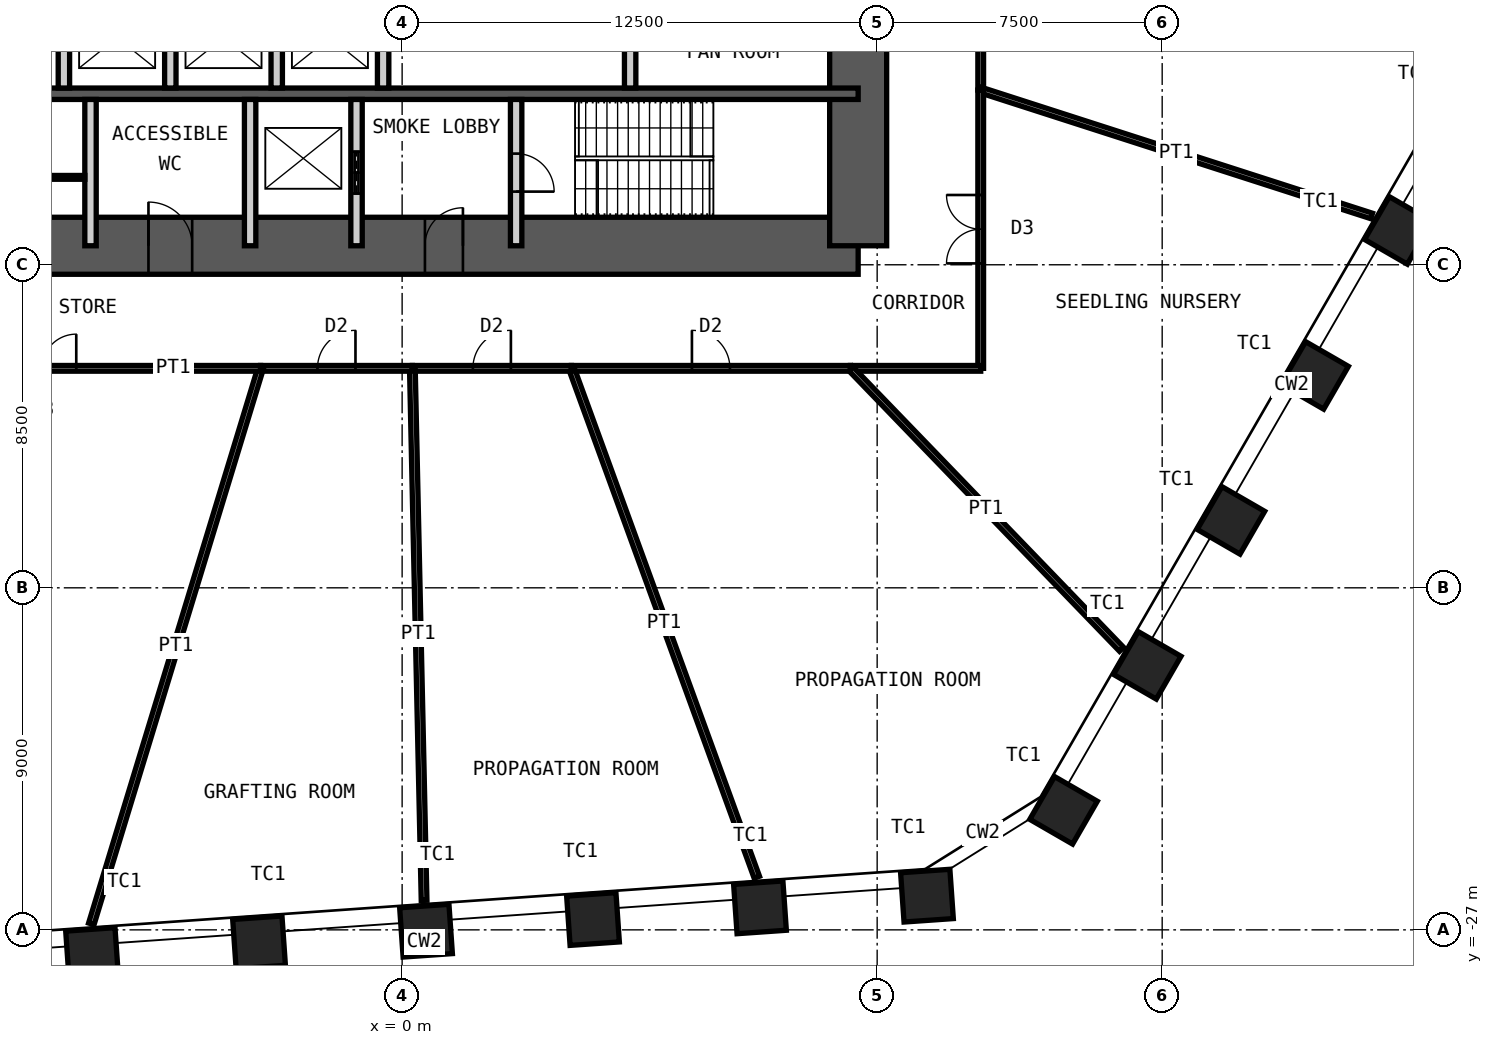
"""IFC4 building model, lengths in metres.
Left out: names, types, materials, properties, quantities, classifications, styles, units other than length and angle.
Written with IfcOpenShell. Run it as: python <this file> out.ifc"""

import sys

from ifc_helpers import new_model, si_unit, direction, frame, frame_2d, origin, origin_2d, place, context, subcontext, project, spatial, rectangle, hollow_rectangle, extrude, element, fill, save


model = new_model("IFC4")
c1 = context("Model", 3, precision=1e-05, world=origin(), true_north=direction((0.0, 1.0)))
c2 = subcontext(c1, "Body", "Model", "MODEL_VIEW")
j1 = project(units=[si_unit("LENGTHUNIT", "METRE"), si_unit("PLANEANGLEUNIT", "RADIAN")], contexts=[c1])
p1 = place(None, origin())
s1 = spatial("IfcSite", under=j1, at=p1, CompositionType="ELEMENT")
p2 = place(p1, origin())
s2 = spatial("IfcBuilding", under=s1, at=p2, CompositionType="ELEMENT")
p3 = place(p2, frame((0.0, 0.0, 32.0)))
s3 = spatial("IfcBuildingStorey", under=s2, at=p3, CompositionType="ELEMENT", Elevation=32.0)
for number, where, z_axis, x_axis in (
    (1, (26.214, -8.596, 0.0), (0.0, 0.0, 1.0), (0.5, 0.866, 0.0)),
    (2, (24.011, -12.411, 0.0), (0.0, 0.0, 1.0), (0.5, 0.866, 0.0)),
    (3, (21.809, -16.225, 0.0), (0.0, 0.0, 1.0), (0.5, 0.866, 0.0)),
    (4, (19.607, -20.04, 0.0), (0.0, 0.0, 1.0), (0.5, 0.866, 0.0)),
    (5, (17.405, -23.854, 0.0), (0.0, 0.0, 1.0), (0.5, 0.866, 0.0)),
    (6, (13.811, -26.1, 0.0), (0.0, 0.0, 1.0), (0.998, 0.07, 0.0)),
    (7, (9.417, -26.407, 0.0), (0.0, 0.0, 1.0), (0.998, 0.07, 0.0)),
    (8, (5.023, -26.715, 0.0), (0.0, 0.0, 1.0), (0.998, 0.07, 0.0)),
    (9, (0.629, -27.022, 0.0), (0.0, 0.0, 1.0), (0.998, 0.07, 0.0)),
    (10, (-3.765, -27.329, 0.0), (0.0, 0.0, 1.0), (0.998, 0.07, 0.0)),
    (11, (-8.159, -27.636, 0.0), (0.0, 0.0, 1.0), (0.998, 0.07, 0.0)),
):
    element("IfcColumn", number, at=place(p3, frame(where, z_axis=z_axis, x_axis=x_axis)), inside=s3, PredefinedType="COLUMN", context=c2, shape_type="SweptSolid", body=[
        extrude(hollow_rectangle(XDim=1.3, YDim=1.3, WallThickness=0.1, at=origin_2d()), origin(), (0.0, 0.0, 1.0), 5.0),
    ])
p4 = place(p3, frame((-12.0, -9.0, 0.0), z_axis=(0.0, 0.0, 1.0), x_axis=(1.0, 0.0, 0.0)))
e12 = element("IfcWall", 12, at=p4, inside=s3, PredefinedType="SHEAR", context=c2, shape_type="SweptSolid", body=[
    extrude(rectangle(XDim=24.0, YDim=1.5, at=frame_2d((12.0, 0.0))), origin(), (0.0, 0.0, 1.0), 5.0),
])
p5 = place(p4, frame((1.35, 0.0, 0.0)))
e13 = element("IfcOpeningElement", 13, at=p5, cuts=e12, PredefinedType="OPENING", context=c2, shape_type="SweptSolid", body=[
    extrude(rectangle(XDim=1.0, YDim=2.1, at=frame_2d((0.5, 1.05))), frame((0.0, 0.76, 0.0), z_axis=(0.0, -1.0, 0.0), x_axis=(1.0, 0.0, 0.0)), (0.0, 0.0, 1.0), 1.52),
])
p6 = place(p4, frame((5.325, 0.0, 0.0)))
e14 = element("IfcOpeningElement", 14, at=p6, cuts=e12, PredefinedType="OPENING", context=c2, shape_type="SweptSolid", body=[
    extrude(rectangle(XDim=1.15, YDim=2.1, at=frame_2d((0.575, 1.05))), frame((0.0, 0.76, 0.0), z_axis=(0.0, -1.0, 0.0), x_axis=(1.0, 0.0, 0.0)), (0.0, 0.0, 1.0), 1.52),
])
p7 = place(p4, frame((12.6, 0.0, 0.0)))
e15 = element("IfcOpeningElement", 15, at=p7, cuts=e12, PredefinedType="OPENING", context=c2, shape_type="SweptSolid", body=[
    extrude(rectangle(XDim=1.0, YDim=2.1, at=frame_2d((0.5, 1.05))), frame((0.0, 0.76, 0.0), z_axis=(0.0, -1.0, 0.0), x_axis=(1.0, 0.0, 0.0)), (0.0, 0.0, 1.0), 1.52),
])
p8 = place(p3, frame((12.0, -9.0, 0.0), z_axis=(0.0, 0.0, 1.0), x_axis=(0.0, 1.0, 0.0)))
e16 = element("IfcWall", 16, at=p8, inside=s3, PredefinedType="SHEAR", context=c2, shape_type="SweptSolid", body=[
    extrude(rectangle(XDim=18.0, YDim=1.5, at=frame_2d((9.0, 0.0))), origin(), (0.0, 0.0, 1.0), 5.0),
])
p9 = place(p8, frame((8.1, 0.0, 0.0)))
e17 = element("IfcOpeningElement", 17, at=p9, cuts=e16, PredefinedType="OPENING", context=c2, shape_type="SweptSolid", body=[
    extrude(rectangle(XDim=1.8, YDim=2.1, at=frame_2d((0.9, 1.05))), frame((0.0, 0.76, 0.0), z_axis=(0.0, -1.0, 0.0), x_axis=(1.0, 0.0, 0.0)), (0.0, 0.0, 1.0), 1.52),
])
p10 = place(p3, frame((-12.0, -5.0, 0.0), z_axis=(0.0, 0.0, 1.0), x_axis=(1.0, 0.0, 0.0)))
e18 = element("IfcWall", 18, at=p10, inside=s3, PredefinedType="SHEAR", context=c2, shape_type="SweptSolid", body=[
    extrude(rectangle(XDim=24.0, YDim=0.3, at=frame_2d((12.0, 0.0))), origin(), (0.0, 0.0, 1.0), 5.0),
])
for number, where, z_axis, x_axis in (
    (19, (-8.9, -4.85, 0.0), (0.0, 0.0, 1.0), (0.0, 1.0, 0.0)),
    (20, (-6.1, -4.85, 0.0), (0.0, 0.0, 1.0), (0.0, 1.0, 0.0)),
    (21, (-3.3, -4.85, 0.0), (0.0, 0.0, 1.0), (0.0, 1.0, 0.0)),
    (22, (-0.5, -4.85, 0.0), (0.0, 0.0, 1.0), (0.0, 1.0, 0.0)),
    (23, (6.0, -4.85, 0.0), (0.0, 0.0, 1.0), (0.0, 1.0, 0.0)),
):
    element("IfcWall", number, at=place(p3, frame(where, z_axis=z_axis, x_axis=x_axis)), inside=s3, PredefinedType="PARTITIONING", context=c2, shape_type="SweptSolid", body=[
        extrude(rectangle(XDim=2.65, YDim=0.3, at=frame_2d((1.325, 0.0))), origin(), (0.0, 0.0, 1.0), 4.78),
    ])
for number, where, z_axis, x_axis in (
    (24, (-8.2, -9.0, 0.0), (0.0, 0.0, 1.0), (0.0, 1.0, 0.0)),
    (25, (-4.0, -9.0, 0.0), (0.0, 0.0, 1.0), (0.0, 1.0, 0.0)),
):
    element("IfcWall", number, at=place(p3, frame(where, z_axis=z_axis, x_axis=x_axis)), inside=s3, PredefinedType="PARTITIONING", context=c2, shape_type="SweptSolid", body=[
        extrude(rectangle(XDim=3.85, YDim=0.3, at=frame_2d((1.925, 0.0))), origin(), (0.0, 0.0, 1.0), 4.78),
    ])
p11 = place(p3, frame((-1.2, -9.0, 0.0), z_axis=(0.0, 0.0, 1.0), x_axis=(0.0, 1.0, 0.0)))
e26 = element("IfcWall", 26, at=p11, inside=s3, PredefinedType="PARTITIONING", context=c2, shape_type="SweptSolid", body=[
    extrude(rectangle(XDim=3.85, YDim=0.3, at=frame_2d((1.925, 0.0))), origin(), (0.0, 0.0, 1.0), 4.78),
])
p12 = place(p11, frame((1.375, 0.0, 0.0)))
e27 = element("IfcOpeningElement", 27, at=p12, cuts=e26, PredefinedType="OPENING", context=c2, shape_type="SweptSolid", body=[
    extrude(rectangle(XDim=1.1, YDim=2.4, at=frame_2d((0.55, 1.2))), frame((0.0, 0.16, 0.0), z_axis=(0.0, -1.0, 0.0), x_axis=(1.0, 0.0, 0.0)), (0.0, 0.0, 1.0), 0.32),
])
p13 = place(p3, frame((3.0, -9.0, 0.0), z_axis=(0.0, 0.0, 1.0), x_axis=(0.0, 1.0, 0.0)))
e28 = element("IfcWall", 28, at=p13, inside=s3, PredefinedType="PARTITIONING", context=c2, shape_type="SweptSolid", body=[
    extrude(rectangle(XDim=3.85, YDim=0.3, at=frame_2d((1.925, 0.0))), origin(), (0.0, 0.0, 1.0), 4.78),
])
p14 = place(p13, frame((1.425, 0.0, 0.0)))
e29 = element("IfcOpeningElement", 29, at=p14, cuts=e28, PredefinedType="OPENING", context=c2, shape_type="SweptSolid", body=[
    extrude(rectangle(XDim=1.0, YDim=2.1, at=frame_2d((0.5, 1.05))), frame((0.0, 0.16, 0.0), z_axis=(0.0, -1.0, 0.0), x_axis=(1.0, 0.0, 0.0)), (0.0, 0.0, 1.0), 0.32),
])
p15 = place(p3, frame((-11.25, -7.2, 0.0), z_axis=(0.0, 0.0, 1.0), x_axis=(1.0, 0.0, 0.0)))
e30 = element("IfcWall", 30, at=p15, inside=s3, PredefinedType="PARTITIONING", context=c2, shape_type="SweptSolid", body=[
    extrude(rectangle(XDim=2.9, YDim=0.1, at=frame_2d((1.45, 0.0))), origin(), (0.0, 0.0, 1.0), 4.78),
])
p16 = place(p15, frame((0.1, 0.0, 0.0)))
e31 = element("IfcOpeningElement", 31, at=p16, cuts=e30, PredefinedType="OPENING", context=c2, shape_type="SweptSolid", body=[
    extrude(rectangle(XDim=1.0, YDim=2.4, at=frame_2d((0.5, 1.2))), frame((0.0, 0.06, 0.0), z_axis=(0.0, -1.0, 0.0), x_axis=(1.0, 0.0, 0.0)), (0.0, 0.0, 1.0), 0.12),
])
p17 = place(p3, frame((15.225, 3.53, 0.0), z_axis=(0.0, 0.0, 1.0), x_axis=(0.0, -1.0, 0.0)))
e32 = element("IfcWall", 32, at=p17, inside=s3, PredefinedType="PARTITIONING", context=c2, shape_type="SweptSolid", body=[
    extrude(rectangle(XDim=8.433, YDim=0.15, at=frame_2d((4.217, 0.0))), origin(), (0.0, 0.0, 1.0), 4.8),
])
p18 = place(p17, frame((3.317, 0.0, 0.0)))
e33 = element("IfcOpeningElement", 33, at=p18, cuts=e32, PredefinedType="OPENING", context=c2, shape_type="SweptSolid", body=[
    extrude(rectangle(XDim=1.8, YDim=2.4, at=frame_2d((0.9, 1.2))), frame((0.0, 0.085, 0.0), z_axis=(0.0, -1.0, 0.0), x_axis=(1.0, 0.0, 0.0)), (0.0, 0.0, 1.0), 0.17),
])
p19 = place(p3, frame((25.512, -8.216, 0.0), z_axis=(0.0, 0.0, 1.0), x_axis=(-0.95186413264, 0.306520265225, 0.0)))
e34 = element("IfcWall", 34, at=p19, inside=s3, PredefinedType="PARTITIONING", context=c2, shape_type="SweptSolid", body=[
    extrude(rectangle(XDim=10.808, YDim=0.15, at=frame_2d((5.404, 0.0))), origin(), (0.0, 0.0, 1.0), 3.7),
])
p20 = place(p3, frame((15.225, -4.903, 0.0), z_axis=(0.0, 0.0, 1.0), x_axis=(0.0, -1.0, 0.0)))
e35 = element("IfcWall", 35, at=p20, inside=s3, PredefinedType="PARTITIONING", context=c2, shape_type="SweptSolid", body=[
    extrude(rectangle(XDim=7.322, YDim=0.15, at=frame_2d((3.661, 0.0))), origin(), (0.0, 0.0, 1.0), 4.8),
])
p21 = place(p20, frame((2.761, 0.0, 0.0)))
e36 = element("IfcOpeningElement", 36, at=p21, cuts=e35, PredefinedType="OPENING", context=c2, shape_type="SweptSolid", body=[
    extrude(rectangle(XDim=1.8, YDim=2.4, at=frame_2d((0.9, 1.2))), frame((0.0, 0.085, 0.0), z_axis=(0.0, -1.0, 0.0), x_axis=(1.0, 0.0, 0.0)), (0.0, 0.0, 1.0), 0.17),
])
p22 = place(p3, frame((15.225, -12.225, 0.0), z_axis=(0.0, 0.0, 1.0), x_axis=(-1.0, 0.0, 0.0)))
e37 = element("IfcWall", 37, at=p22, inside=s3, PredefinedType="PARTITIONING", context=c2, shape_type="SweptSolid", body=[
    extrude(rectangle(XDim=3.428, YDim=0.15, at=frame_2d((1.714, 0.0))), origin(), (0.0, 0.0, 1.0), 4.8),
])
p23 = place(p3, frame((18.931, -19.618, 0.0), z_axis=(0.0, 0.0, 1.0), x_axis=(-0.694399830455, 0.719589379761, 0.0)))
e38 = element("IfcWall", 38, at=p23, inside=s3, PredefinedType="PARTITIONING", context=c2, shape_type="SweptSolid", body=[
    extrude(rectangle(XDim=10.274, YDim=0.15, at=frame_2d((5.137, 0.0))), origin(), (0.0, 0.0, 1.0), 3.7),
])
p24 = place(p3, frame((11.797, -12.225, 0.0), z_axis=(0.0, 0.0, 1.0), x_axis=(-1.0, 0.0, 0.0)))
e39 = element("IfcWall", 39, at=p24, inside=s3, PredefinedType="PARTITIONING", context=c2, shape_type="SweptSolid", body=[
    extrude(rectangle(XDim=7.343, YDim=0.15, at=frame_2d((3.671, 0.0))), origin(), (0.0, 0.0, 1.0), 4.8),
])
p25 = place(p24, frame((3.171, 0.0, 0.0)))
e40 = element("IfcOpeningElement", 40, at=p25, cuts=e39, PredefinedType="OPENING", context=c2, shape_type="SweptSolid", body=[
    extrude(rectangle(XDim=1.0, YDim=2.4, at=frame_2d((0.5, 1.2))), frame((0.0, 0.085, 0.0), z_axis=(0.0, -1.0, 0.0), x_axis=(1.0, 0.0, 0.0)), (0.0, 0.0, 1.0), 0.17),
])
p26 = place(p3, frame((9.333, -25.615, 0.0), z_axis=(0.0, 0.0, 1.0), x_axis=(-0.342348208267, 0.939573150051, 0.0)))
e41 = element("IfcWall", 41, at=p26, inside=s3, PredefinedType="PARTITIONING", context=c2, shape_type="SweptSolid", body=[
    extrude(rectangle(XDim=14.251, YDim=0.15, at=frame_2d((7.125, 0.0))), origin(), (0.0, 0.0, 1.0), 3.7),
])
p27 = place(p3, frame((4.455, -12.225, 0.0), z_axis=(0.0, 0.0, 1.0), x_axis=(-1.0, 0.0, 0.0)))
e42 = element("IfcWall", 42, at=p27, inside=s3, PredefinedType="PARTITIONING", context=c2, shape_type="SweptSolid", body=[
    extrude(rectangle(XDim=4.185, YDim=0.15, at=frame_2d((2.093, 0.0))), origin(), (0.0, 0.0, 1.0), 4.8),
])
p28 = place(p27, frame((1.593, 0.0, 0.0)))
e43 = element("IfcOpeningElement", 43, at=p28, cuts=e42, PredefinedType="OPENING", context=c2, shape_type="SweptSolid", body=[
    extrude(rectangle(XDim=1.0, YDim=2.4, at=frame_2d((0.5, 1.2))), frame((0.0, 0.085, 0.0), z_axis=(0.0, -1.0, 0.0), x_axis=(1.0, 0.0, 0.0)), (0.0, 0.0, 1.0), 0.17),
])
p29 = place(p3, frame((0.578, -26.224, 0.0), z_axis=(0.0, 0.0, 1.0), x_axis=(-0.022039362711, 0.999757103746, 0.0)))
e44 = element("IfcWall", 44, at=p29, inside=s3, PredefinedType="PARTITIONING", context=c2, shape_type="SweptSolid", body=[
    extrude(rectangle(XDim=14.002, YDim=0.15, at=frame_2d((7.001, 0.0))), origin(), (0.0, 0.0, 1.0), 3.7),
])
p30 = place(p3, frame((0.269, -12.225, 0.0), z_axis=(0.0, 0.0, 1.0), x_axis=(-1.0, 0.0, 0.0)))
e45 = element("IfcWall", 45, at=p30, inside=s3, PredefinedType="PARTITIONING", context=c2, shape_type="SweptSolid", body=[
    extrude(rectangle(XDim=3.994, YDim=0.15, at=frame_2d((1.997, 0.0))), origin(), (0.0, 0.0, 1.0), 4.8),
])
p31 = place(p30, frame((1.497, 0.0, 0.0)))
e46 = element("IfcOpeningElement", 46, at=p31, cuts=e45, PredefinedType="OPENING", context=c2, shape_type="SweptSolid", body=[
    extrude(rectangle(XDim=1.0, YDim=2.4, at=frame_2d((0.5, 1.2))), frame((0.0, 0.085, 0.0), z_axis=(0.0, -1.0, 0.0), x_axis=(1.0, 0.0, 0.0)), (0.0, 0.0, 1.0), 0.17),
])
p32 = place(p3, frame((-8.179, -26.843, 0.0), z_axis=(0.0, 0.0, 1.0), x_axis=(0.291465492753, 0.956581343397, 0.0)))
e47 = element("IfcWall", 47, at=p32, inside=s3, PredefinedType="PARTITIONING", context=c2, shape_type="SweptSolid", body=[
    extrude(rectangle(XDim=15.281, YDim=0.15, at=frame_2d((7.641, 0.0))), origin(), (0.0, 0.0, 1.0), 3.7),
])
p33 = place(p3, frame((-3.725, -12.225, 0.0), z_axis=(0.0, 0.0, 1.0), x_axis=(-1.0, 0.0, 0.0)))
e48 = element("IfcWall", 48, at=p33, inside=s3, PredefinedType="PARTITIONING", context=c2, shape_type="SweptSolid", body=[
    extrude(rectangle(XDim=11.5, YDim=0.15, at=frame_2d((5.75, 0.0))), origin(), (0.0, 0.0, 1.0), 4.8),
])
p34 = place(p33, frame((4.85, 0.0, 0.0)))
e49 = element("IfcOpeningElement", 49, at=p34, cuts=e48, PredefinedType="OPENING", context=c2, shape_type="SweptSolid", body=[
    extrude(rectangle(XDim=1.8, YDim=2.4, at=frame_2d((0.9, 1.2))), frame((0.0, 0.085, 0.0), z_axis=(0.0, -1.0, 0.0), x_axis=(1.0, 0.0, 0.0)), (0.0, 0.0, 1.0), 0.17),
])
p35 = place(p6, origin())
e50 = element("IfcDoor", 50, at=p35, inside=s3, OperationType="SINGLE_SWING_RIGHT", PredefinedType="DOOR", context=c2, shape_type="SweptSolid", body=[
    extrude(rectangle(XDim=1.15, YDim=2.1, at=frame_2d((0.575, 1.05))), frame((0.0, 0.025, 0.0), z_axis=(0.0, -1.0, 0.0), x_axis=(1.0, 0.0, 0.0)), (0.0, 0.0, 1.0), 0.05),
])
fill(e14, e50)
p36 = place(p7, origin())
e51 = element("IfcDoor", 51, at=p36, inside=s3, OperationType="SINGLE_SWING_LEFT", PredefinedType="DOOR", context=c2, shape_type="SweptSolid", body=[
    extrude(rectangle(XDim=1.0, YDim=2.1, at=frame_2d((0.5, 1.05))), frame((0.0, 0.025, 0.0), z_axis=(0.0, -1.0, 0.0), x_axis=(1.0, 0.0, 0.0)), (0.0, 0.0, 1.0), 0.05),
])
fill(e15, e51)
p37 = place(p14, origin())
e52 = element("IfcDoor", 52, at=p37, inside=s3, OperationType="SINGLE_SWING_LEFT", PredefinedType="DOOR", context=c2, shape_type="SweptSolid", body=[
    extrude(rectangle(XDim=1.0, YDim=2.1, at=frame_2d((0.5, 1.05))), frame((0.0, 0.025, 0.0), z_axis=(0.0, -1.0, 0.0), x_axis=(1.0, 0.0, 0.0)), (0.0, 0.0, 1.0), 0.05),
])
fill(e29, e52)
p38 = place(p12, origin())
e53 = element("IfcDoor", 53, at=p38, inside=s3, OperationType="DOUBLE_DOOR_SLIDING", PredefinedType="DOOR", context=c2, shape_type="SweptSolid", body=[
    extrude(rectangle(XDim=1.1, YDim=2.4, at=frame_2d((0.55, 1.2))), frame((0.0, 0.025, 0.0), z_axis=(0.0, -1.0, 0.0), x_axis=(1.0, 0.0, 0.0)), (0.0, 0.0, 1.0), 0.05),
])
fill(e27, e53)
p39 = place(p21, origin())
e54 = element("IfcDoor", 54, at=p39, inside=s3, OperationType="DOUBLE_DOOR_DOUBLE_SWING", PredefinedType="DOOR", context=c2, shape_type="SweptSolid", body=[
    extrude(rectangle(XDim=1.8, YDim=2.4, at=frame_2d((0.9, 1.2))), frame((0.0, 0.025, 0.0), z_axis=(0.0, -1.0, 0.0), x_axis=(1.0, 0.0, 0.0)), (0.0, 0.0, 1.0), 0.05),
])
fill(e36, e54)
p40 = place(p25, origin())
e55 = element("IfcDoor", 55, at=p40, inside=s3, OperationType="SINGLE_SWING_RIGHT", PredefinedType="DOOR", context=c2, shape_type="SweptSolid", body=[
    extrude(rectangle(XDim=1.0, YDim=2.4, at=frame_2d((0.5, 1.2))), frame((0.0, 0.025, 0.0), z_axis=(0.0, -1.0, 0.0), x_axis=(1.0, 0.0, 0.0)), (0.0, 0.0, 1.0), 0.05),
])
fill(e40, e55)
p41 = place(p28, origin())
e56 = element("IfcDoor", 56, at=p41, inside=s3, OperationType="SINGLE_SWING_LEFT", PredefinedType="DOOR", context=c2, shape_type="SweptSolid", body=[
    extrude(rectangle(XDim=1.0, YDim=2.4, at=frame_2d((0.5, 1.2))), frame((0.0, 0.025, 0.0), z_axis=(0.0, -1.0, 0.0), x_axis=(1.0, 0.0, 0.0)), (0.0, 0.0, 1.0), 0.05),
])
fill(e43, e56)
p42 = place(p31, origin())
e57 = element("IfcDoor", 57, at=p42, inside=s3, OperationType="SINGLE_SWING_LEFT", PredefinedType="DOOR", context=c2, shape_type="SweptSolid", body=[
    extrude(rectangle(XDim=1.0, YDim=2.4, at=frame_2d((0.5, 1.2))), frame((0.0, 0.025, 0.0), z_axis=(0.0, -1.0, 0.0), x_axis=(1.0, 0.0, 0.0)), (0.0, 0.0, 1.0), 0.05),
])
fill(e46, e57)
p43 = place(p34, origin())
e58 = element("IfcDoor", 58, at=p43, inside=s3, OperationType="DOUBLE_DOOR_DOUBLE_SWING", PredefinedType="DOOR", context=c2, shape_type="SweptSolid", body=[
    extrude(rectangle(XDim=1.8, YDim=2.4, at=frame_2d((0.9, 1.2))), frame((0.0, 0.025, 0.0), z_axis=(0.0, -1.0, 0.0), x_axis=(1.0, 0.0, 0.0)), (0.0, 0.0, 1.0), 0.05),
])
fill(e49, e58)
save(model, sys.argv[1])
